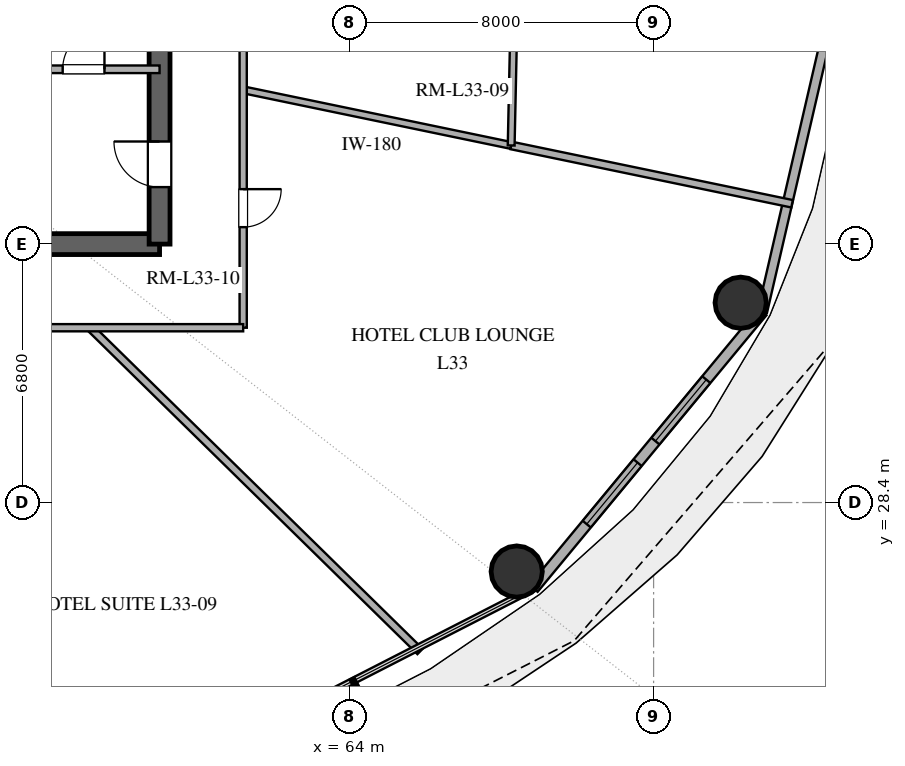
"""IFC4 building model, lengths in metres.
Left out: names, types, materials, properties, quantities, classifications, styles, units other than length and angle.
Written with IfcOpenShell. Run it as: python <this file> out.ifc"""

import sys

from ifc_helpers import new_model, si_unit, direction, frame, frame_2d, origin, origin_2d, place, context, subcontext, project, spatial, rectangle, hollow_circle, extrude, element, fill, save


model = new_model("IFC4")
c1 = context("Model", 3, precision=1e-05, world=origin(), true_north=direction((0.0, 1.0)))
c2 = subcontext(c1, "Body", "Model", "MODEL_VIEW")
j1 = project(units=[si_unit("LENGTHUNIT", "METRE"), si_unit("PLANEANGLEUNIT", "RADIAN")], contexts=[c1])
p1 = place(None, origin())
s1 = spatial("IfcSite", under=j1, at=p1, CompositionType="ELEMENT")
p2 = place(p1, origin())
s2 = spatial("IfcBuilding", under=s1, at=p2, CompositionType="ELEMENT")
p3 = place(p2, frame((0.0, 0.0, 130.8)))
s3 = spatial("IfcBuildingStorey", under=s2, at=p3, CompositionType="ELEMENT", Elevation=130.8)
p4 = place(p3, frame((55.0, 35.2, 0.0), z_axis=(0.0, 0.0, 1.0), x_axis=(1.0, 0.0, 0.0)))
e1 = element("IfcWall", 1, at=p4, inside=s3, PredefinedType="SHEAR", context=c2, shape_type="SweptSolid", body=[
    extrude(rectangle(XDim=4.0, YDim=0.55, at=frame_2d((2.0, 0.0))), origin(), (0.0, 0.0, 1.0), 3.32),
])
p5 = place(p3, frame((59.0, 35.2, 0.0), z_axis=(0.0, 0.0, 1.0), x_axis=(0.0, 1.0, 0.0)))
e2 = element("IfcWall", 2, at=p5, inside=s3, PredefinedType="SHEAR", context=c2, shape_type="SweptSolid", body=[
    extrude(rectangle(XDim=13.6, YDim=0.55, at=frame_2d((6.8, 0.0))), origin(), (0.0, 0.0, 1.0), 3.32),
])
p6 = place(p5, frame((1.5, 0.0, 0.0)))
e3 = element("IfcOpeningElement", 3, at=p6, cuts=e2, PredefinedType="OPENING", context=c2, shape_type="SweptSolid", body=[
    extrude(rectangle(XDim=1.2, YDim=2.15, at=frame_2d((0.6, 1.075))), frame((0.0, 0.285, 0.0), z_axis=(0.0, -1.0, 0.0), x_axis=(1.0, 0.0, 0.0)), (0.0, 0.0, 1.0), 0.57),
])
for number, where, z_axis, x_axis in (
    (4, (68.398, 26.585, 0.0), (0.0, 0.0, 1.0), (1.0, 0.0, 0.0)),
    (5, (74.291, 33.657, 0.0), (0.0, 0.0, 1.0), (1.0, 0.0, 0.0)),
):
    element("IfcColumn", number, at=place(p3, frame(where, z_axis=z_axis, x_axis=x_axis)), inside=s3, PredefinedType="COLUMN", context=c2, shape_type="SweptSolid", body=[
        extrude(hollow_circle(Radius=0.675, WallThickness=0.036, at=origin_2d()), origin(), (0.0, 0.0, 1.0), 3.32),
    ])
p7 = place(p3, frame((68.84, 26.14, 0.0), z_axis=(0.0, 0.0, 1.0), x_axis=(0.637505817448, 0.770445541696, 0.0)))
e6 = element("IfcWall", 6, at=p7, inside=s3, PredefinedType="SOLIDWALL", context=c2, shape_type="SweptSolid", body=[
    extrude(rectangle(XDim=9.445, YDim=0.28, at=frame_2d((4.723, 0.0))), origin(), (0.0, 0.0, 1.0), 3.32),
])
p8 = place(p7, frame((2.197, 0.0, 0.85)))
e7 = element("IfcOpeningElement", 7, at=p8, cuts=e6, PredefinedType="OPENING", context=c2, shape_type="SweptSolid", body=[
    extrude(rectangle(XDim=2.1, YDim=2.2, at=frame_2d((1.05, 1.1))), frame((0.0, 0.15, 0.0), z_axis=(0.0, -1.0, 0.0), x_axis=(1.0, 0.0, 0.0)), (0.0, 0.0, 1.0), 0.3),
])
p9 = place(p7, frame((5.032, 0.0, 0.85)))
e8 = element("IfcOpeningElement", 8, at=p9, cuts=e6, PredefinedType="OPENING", context=c2, shape_type="SweptSolid", body=[
    extrude(rectangle(XDim=2.1, YDim=2.2, at=frame_2d((1.05, 1.1))), frame((0.0, 0.15, 0.0), z_axis=(0.0, -1.0, 0.0), x_axis=(1.0, 0.0, 0.0)), (0.0, 0.0, 1.0), 0.3),
])
p10 = place(p3, frame((74.861, 33.417, 0.0), z_axis=(0.0, 0.0, 1.0), x_axis=(0.22558597182, 0.974223264616, 0.0)))
e9 = element("IfcWall", 9, at=p10, inside=s3, PredefinedType="SOLIDWALL", context=c2, shape_type="SweptSolid", body=[
    extrude(rectangle(XDim=8.811, YDim=0.25, at=frame_2d((4.405, 0.0))), origin(), (0.0, 0.0, 1.0), 3.32),
])
p11 = place(p3, frame((55.0, 39.8, 0.0), z_axis=(0.0, 0.0, 1.0), x_axis=(1.0, 0.0, 0.0)))
e10 = element("IfcWall", 10, at=p11, inside=s3, PredefinedType="SOLIDWALL", context=c2, shape_type="SweptSolid", body=[
    extrude(rectangle(XDim=4.0, YDim=0.2, at=frame_2d((2.0, 0.0))), origin(), (0.0, 0.0, 1.0), 2.68),
])
p12 = place(p11, frame((1.45, 0.0, 0.0)))
e11 = element("IfcOpeningElement", 11, at=p12, cuts=e10, PredefinedType="OPENING", context=c2, shape_type="SweptSolid", body=[
    extrude(rectangle(XDim=1.1, YDim=2.15, at=frame_2d((0.55, 1.075))), frame((0.0, 0.11, 0.0), z_axis=(0.0, -1.0, 0.0), x_axis=(1.0, 0.0, 0.0)), (0.0, 0.0, 1.0), 0.22),
])
p13 = place(p3, frame((57.173, 33.0, 0.0), z_axis=(0.0, 0.0, 1.0), x_axis=(0.713799293149, -0.700350318841, 0.0)))
e12 = element("IfcWall", 12, at=p13, inside=s3, PredefinedType="PARTITIONING", context=c2, shape_type="SweptSolid", body=[
    extrude(rectangle(XDim=12.163, YDim=0.2, at=frame_2d((6.081, 0.0))), origin(), (0.0, 0.0, 1.0), 2.68),
])
p14 = place(p3, frame((75.643, 36.262, 0.0), z_axis=(0.0, 0.0, 1.0), x_axis=(-0.979129223201, 0.203238687937, 0.0)))
e13 = element("IfcWall", 13, at=p14, inside=s3, PredefinedType="PARTITIONING", context=c2, shape_type="SweptSolid", body=[
    extrude(rectangle(XDim=7.549, YDim=0.2, at=frame_2d((3.774, 0.0))), origin(), (0.0, 0.0, 1.0), 2.68),
])
p15 = place(p3, frame((68.252, 37.796, 0.0), z_axis=(0.0, 0.0, 1.0), x_axis=(-0.979121746523, 0.20327470449, 0.0)))
e14 = element("IfcWall", 14, at=p15, inside=s3, PredefinedType="PLUMBINGWALL", context=c2, shape_type="SweptSolid", body=[
    extrude(rectangle(XDim=7.203, YDim=0.18, at=frame_2d((3.601, 0.0))), origin(), (0.0, 0.0, 1.0), 2.68),
])
p16 = place(p3, frame((61.2, 41.749, 0.0), z_axis=(0.0, 0.0, 1.0), x_axis=(0.0, -1.0, 0.0)))
e15 = element("IfcWall", 15, at=p16, inside=s3, PredefinedType="PARTITIONING", context=c2, shape_type="SweptSolid", body=[
    extrude(rectangle(XDim=8.749, YDim=0.19, at=frame_2d((4.375, 0.0))), origin(), (0.0, 0.0, 1.0), 2.68),
])
p17 = place(p16, frame((5.103, 0.0, 0.0)))
e16 = element("IfcOpeningElement", 16, at=p17, cuts=e15, PredefinedType="OPENING", context=c2, shape_type="SweptSolid", body=[
    extrude(rectangle(XDim=1.0, YDim=2.2, at=frame_2d((0.5, 1.1))), frame((0.0, 0.105, 0.0), z_axis=(0.0, -1.0, 0.0), x_axis=(1.0, 0.0, 0.0)), (0.0, 0.0, 1.0), 0.21),
])
p18 = place(p3, frame((61.2, 33.0, 0.0), z_axis=(0.0, 0.0, 1.0), x_axis=(-1.0, 0.0, 0.0)))
e17 = element("IfcWall", 17, at=p18, inside=s3, PredefinedType="PARTITIONING", context=c2, shape_type="SweptSolid", body=[
    extrude(rectangle(XDim=9.355, YDim=0.19, at=frame_2d((4.678, 0.0))), origin(), (0.0, 0.0, 1.0), 2.68),
])
p19 = place(p18, frame((6.193, 0.0, 0.0)))
e18 = element("IfcOpeningElement", 18, at=p19, cuts=e17, PredefinedType="OPENING", context=c2, shape_type="SweptSolid", body=[
    extrude(rectangle(XDim=0.95, YDim=2.15, at=frame_2d((0.475, 1.075))), frame((0.0, 0.105, 0.0), z_axis=(0.0, -1.0, 0.0), x_axis=(1.0, 0.0, 0.0)), (0.0, 0.0, 1.0), 0.21),
])
p20 = place(p3, frame((68.333, 41.564, 0.0), z_axis=(0.0, 0.0, 1.0), x_axis=(-0.021438450782, -0.999770170003, 0.0)))
e19 = element("IfcWall", 19, at=p20, inside=s3, PredefinedType="PLUMBINGWALL", context=c2, shape_type="SweptSolid", body=[
    extrude(rectangle(XDim=3.77, YDim=0.18, at=frame_2d((1.885, 0.0))), origin(), (0.0, 0.0, 1.0), 2.68),
])
p21 = place(p8, origin())
e20 = element("IfcWindow", 20, at=p21, inside=s3, PartitioningType="SINGLE_PANEL", PredefinedType="WINDOW", context=c2, shape_type="SweptSolid", body=[
    extrude(rectangle(XDim=2.1, YDim=2.2, at=frame_2d((1.05, 1.1))), frame((0.0, 0.03, 0.0), z_axis=(0.0, -1.0, 0.0), x_axis=(1.0, 0.0, 0.0)), (0.0, 0.0, 1.0), 0.06),
])
fill(e7, e20)
p22 = place(p9, origin())
e21 = element("IfcWindow", 21, at=p22, inside=s3, PartitioningType="SINGLE_PANEL", PredefinedType="WINDOW", context=c2, shape_type="SweptSolid", body=[
    extrude(rectangle(XDim=2.1, YDim=2.2, at=frame_2d((1.05, 1.1))), frame((0.0, 0.03, 0.0), z_axis=(0.0, -1.0, 0.0), x_axis=(1.0, 0.0, 0.0)), (0.0, 0.0, 1.0), 0.06),
])
fill(e8, e21)
p23 = place(p6, origin())
e22 = element("IfcDoor", 22, at=p23, inside=s3, OperationType="SINGLE_SWING_RIGHT", PredefinedType="DOOR", context=c2, shape_type="SweptSolid", body=[
    extrude(rectangle(XDim=1.2, YDim=2.15, at=frame_2d((0.6, 1.075))), frame((0.0, 0.025, 0.0), z_axis=(0.0, -1.0, 0.0), x_axis=(1.0, 0.0, 0.0)), (0.0, 0.0, 1.0), 0.05),
])
fill(e3, e22)
p24 = place(p12, origin())
e23 = element("IfcDoor", 23, at=p24, inside=s3, OperationType="SINGLE_SWING_RIGHT", PredefinedType="DOOR", context=c2, shape_type="SweptSolid", body=[
    extrude(rectangle(XDim=1.1, YDim=2.15, at=frame_2d((0.55, 1.075))), frame((0.0, 0.025, 0.0), z_axis=(0.0, -1.0, 0.0), x_axis=(1.0, 0.0, 0.0)), (0.0, 0.0, 1.0), 0.05),
])
fill(e11, e23)
p25 = place(p17, origin())
e24 = element("IfcDoor", 24, at=p25, inside=s3, OperationType="SINGLE_SWING_LEFT", PredefinedType="DOOR", context=c2, shape_type="SweptSolid", body=[
    extrude(rectangle(XDim=1.0, YDim=2.2, at=frame_2d((0.5, 1.1))), frame((0.0, 0.025, 0.0), z_axis=(0.0, -1.0, 0.0), x_axis=(1.0, 0.0, 0.0)), (0.0, 0.0, 1.0), 0.05),
])
fill(e16, e24)
save(model, sys.argv[1])
